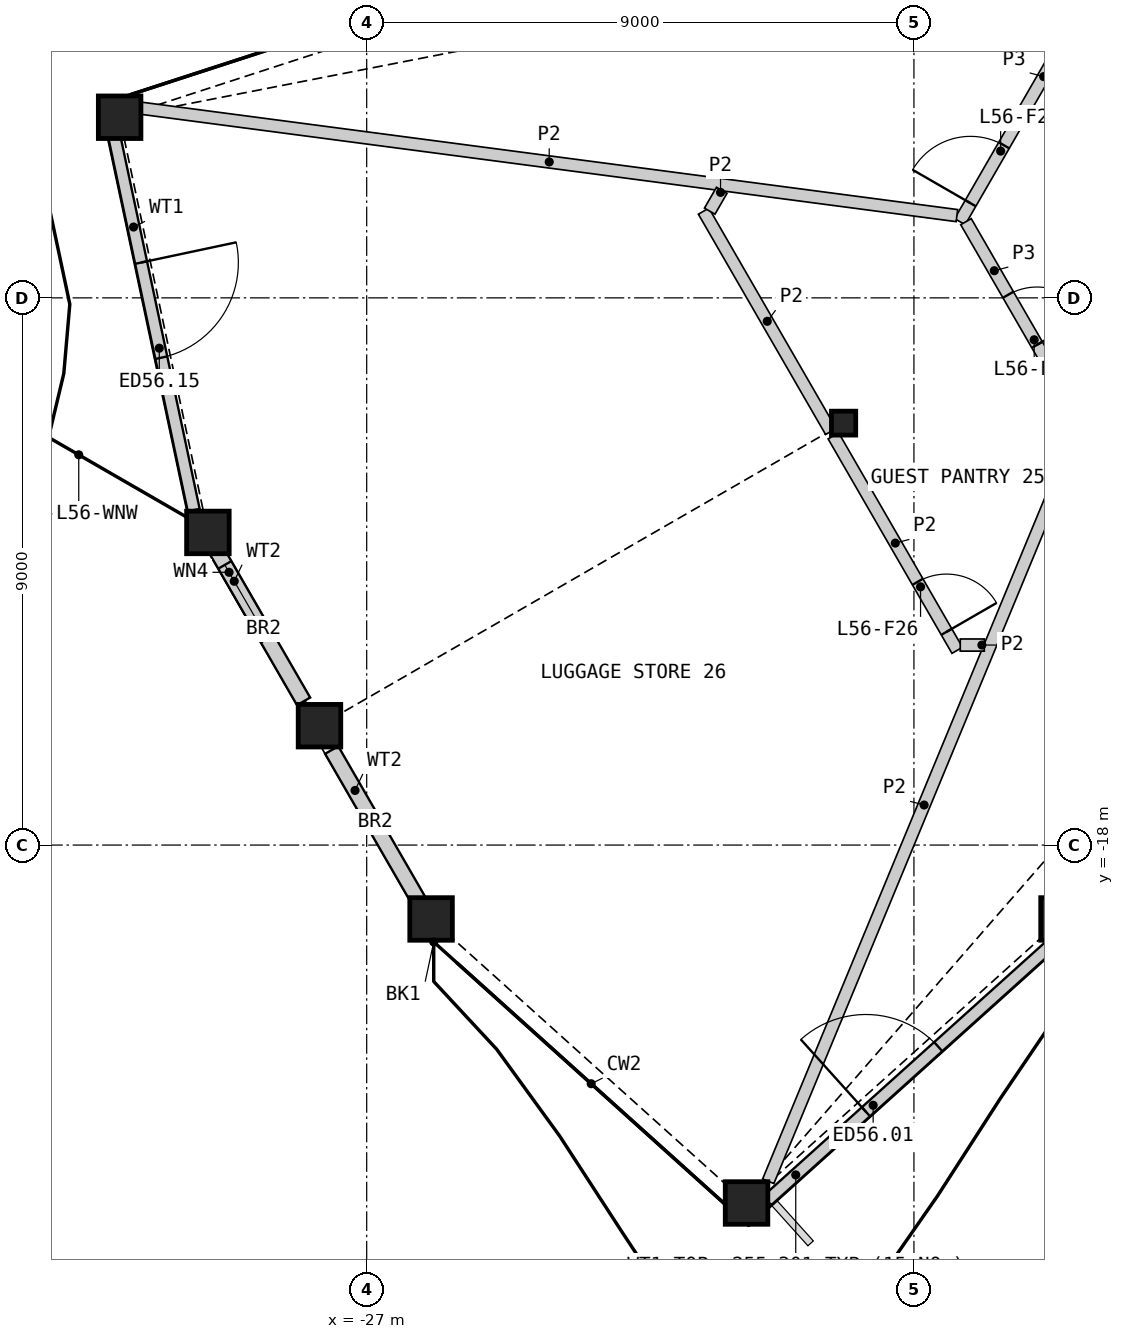
"""IFC4 building model, lengths in metres.
Left out: names, types, materials, properties, quantities, classifications, styles, units other than length and angle.
Written with IfcOpenShell. Run it as: python <this file> out.ifc"""

import sys

from ifc_helpers import new_model, si_unit, direction, frame, frame_2d, origin, origin_2d, place, context, subcontext, project, spatial, rectangle, hollow_rectangle, i_section, extrude, element, fill, save


model = new_model("IFC4")
c1 = context("Model", 3, precision=1e-05, world=origin(), true_north=direction((0.0, 1.0)))
c2 = subcontext(c1, "Body", "Model", "MODEL_VIEW")
j1 = project(units=[si_unit("LENGTHUNIT", "METRE"), si_unit("PLANEANGLEUNIT", "RADIAN")], contexts=[c1])
p1 = place(None, origin())
s1 = spatial("IfcSite", under=j1, at=p1, CompositionType="ELEMENT")
p2 = place(p1, origin())
s2 = spatial("IfcBuilding", under=s1, at=p2, CompositionType="ELEMENT")
p3 = place(p2, frame((0.0, 0.0, 252.6)))
s3 = spatial("IfcBuildingStorey", under=s2, at=p3, CompositionType="ELEMENT", Elevation=252.6)
for number, where, z_axis, x_axis in (
    (1, (-25.941, -19.215, 0.0), (0.0, 0.0, 1.0), (1.0, 0.0, 0.0)),
    (2, (-20.753, -23.887, 0.0), (0.0, 0.0, 1.0), (1.0, 0.0, 0.0)),
    (3, (-15.565, -19.215, 0.0), (0.0, 0.0, 1.0), (1.0, 0.0, 0.0)),
    (4, (-31.063, -6.029, 0.0), (0.0, 0.0, 1.0), (1.0, 0.0, 0.0)),
    (5, (-29.612, -12.858, 0.0), (0.0, 0.0, 1.0), (1.0, 0.0, 0.0)),
    (6, (-27.776, -16.037, 0.0), (0.0, 0.0, 1.0), (1.0, 0.0, 0.0)),
):
    element("IfcColumn", number, at=place(p3, frame(where, z_axis=z_axis, x_axis=x_axis)), inside=s3, PredefinedType="COLUMN", context=c2, shape_type="SweptSolid", body=[
        extrude(hollow_rectangle(XDim=0.7, YDim=0.7, WallThickness=0.045, at=origin_2d()), origin(), (0.0, 0.0, 1.0), 3.6),
    ])
p4 = place(p3, frame((-19.157, -11.06, 0.0), z_axis=(0.0, 0.0, 1.0), x_axis=(1.0, 0.0, 0.0)))
e7 = element("IfcColumn", 7, at=p4, inside=s3, PredefinedType="COLUMN", context=c2, shape_type="SweptSolid", body=[
    extrude(i_section(OverallWidth=0.399, OverallDepth=0.393, WebThickness=0.023, FlangeThickness=0.037, at=origin_2d()), origin(), (0.0, 0.0, 1.0), 3.6),
])
p5 = place(p3, frame((-20.413, -23.848, 0.0), z_axis=(0.0, 0.0, 1.0), x_axis=(0.74314024121, 0.669135697668, 0.0)))
e8 = element("IfcWall", 8, at=p5, inside=s3, PredefinedType="SOLIDWALL", context=c2, shape_type="SweptSolid", body=[
    extrude(rectangle(XDim=6.311, YDim=0.2, at=frame_2d((3.156, 0.0))), origin(), (0.0, 0.0, 1.0), 2.701),
])
p6 = place(p5, frame((2.184, 0.0, 0.0)))
e9 = element("IfcOpeningElement", 9, at=p6, cuts=e8, PredefinedType="OPENING", context=c2, shape_type="SweptSolid", body=[
    extrude(rectangle(XDim=1.6, YDim=2.4, at=frame_2d((0.8, 1.2))), frame((0.0, 0.11, 0.0), z_axis=(0.0, -1.0, 0.0), x_axis=(1.0, 0.0, 0.0)), (0.0, 0.0, 1.0), 0.22),
])
p7 = place(p3, frame((-31.164, -6.283, 0.0), z_axis=(0.0, 0.0, 1.0), x_axis=(0.207900158502, -0.978150051932, 0.0)))
e10 = element("IfcWall", 10, at=p7, inside=s3, PredefinedType="SOLIDWALL", context=c2, shape_type="SweptSolid", body=[
    extrude(rectangle(XDim=6.347, YDim=0.2, at=frame_2d((3.174, 0.0))), origin(), (0.0, 0.0, 1.0), 2.701),
])
p8 = place(p7, frame((2.184, 0.0, 0.0)))
e11 = element("IfcOpeningElement", 11, at=p8, cuts=e10, PredefinedType="OPENING", context=c2, shape_type="SweptSolid", body=[
    extrude(rectangle(XDim=1.6, YDim=2.4, at=frame_2d((0.8, 1.2))), frame((0.0, 0.11, 0.0), z_axis=(0.0, -1.0, 0.0), x_axis=(1.0, 0.0, 0.0)), (0.0, 0.0, 1.0), 0.22),
])
p9 = place(p3, frame((-29.559, -13.002, 0.0), z_axis=(0.0, 0.0, 1.0), x_axis=(0.500023511883, -0.866011828767, 0.0)))
e12 = element("IfcWall", 12, at=p9, inside=s3, PredefinedType="SOLIDWALL", context=c2, shape_type="SweptSolid", body=[
    extrude(rectangle(XDim=3.042, YDim=0.25, at=frame_2d((1.521, 0.0))), origin(), (0.0, 0.0, 1.0), 2.701),
])
p10 = place(p9, frame((0.45, 0.0, 1.8)))
e13 = element("IfcOpeningElement", 13, at=p10, cuts=e12, PredefinedType="OPENING", context=c2, shape_type="SweptSolid", body=[
    extrude(rectangle(XDim=1.4, YDim=0.7, at=frame_2d((0.7, 0.35))), frame((0.0, 0.135, 0.0), z_axis=(0.0, -1.0, 0.0), x_axis=(1.0, 0.0, 0.0)), (0.0, 0.0, 1.0), 0.27),
])
p11 = place(p3, frame((-27.576, -16.437, 0.0), z_axis=(0.0, 0.0, 1.0), x_axis=(0.499976998774, -0.866038683141, 0.0)))
e14 = element("IfcWall", 14, at=p11, inside=s3, PredefinedType="SOLIDWALL", context=c2, shape_type="SweptSolid", body=[
    extrude(rectangle(XDim=3.072, YDim=0.25, at=frame_2d((1.536, 0.0))), origin(), (0.0, 0.0, 1.0), 2.701),
])
p12 = place(p3, frame((-17.244, -7.747, 0.0), z_axis=(0.0, 0.0, 1.0), x_axis=(0.500017753321, 0.866015153657, 0.0)))
e15 = element("IfcWall", 15, at=p12, inside=s3, PredefinedType="PARTITIONING", context=c2, shape_type="SweptSolid", body=[
    extrude(rectangle(XDim=5.51, YDim=0.2, at=frame_2d((2.755, 0.0))), origin(), (0.0, 0.0, 1.0), 3.25),
])
p13 = place(p12, frame((0.35, 0.0, 0.0)))
e16 = element("IfcOpeningElement", 16, at=p13, cuts=e15, PredefinedType="OPENING", context=c2, shape_type="SweptSolid", body=[
    extrude(rectangle(XDim=1.1, YDim=2.1, at=frame_2d((0.55, 1.05))), frame((0.0, 0.11, 0.0), z_axis=(0.0, -1.0, 0.0), x_axis=(1.0, 0.0, 0.0)), (0.0, 0.0, 1.0), 0.22),
])
p14 = place(p3, frame((-17.144, -7.747, 0.0), z_axis=(0.0, 0.0, 1.0), x_axis=(0.499958791762, -0.866049194065, 0.0)))
e17 = element("IfcWall", 17, at=p14, inside=s3, PredefinedType="PARTITIONING", context=c2, shape_type="SweptSolid", body=[
    extrude(rectangle(XDim=3.726, YDim=0.2, at=frame_2d((1.863, 0.0))), origin(), (0.0, 0.0, 1.0), 3.25),
])
p15 = place(p14, frame((1.388, 0.0, 0.0)))
e18 = element("IfcOpeningElement", 18, at=p15, cuts=e17, PredefinedType="OPENING", context=c2, shape_type="SweptSolid", body=[
    extrude(rectangle(XDim=0.95, YDim=2.1, at=frame_2d((0.475, 1.05))), frame((0.0, 0.11, 0.0), z_axis=(0.0, -1.0, 0.0), x_axis=(1.0, 0.0, 0.0)), (0.0, 0.0, 1.0), 0.22),
])
p16 = place(p3, frame((-30.703, -5.882, 0.0), z_axis=(0.0, 0.0, 1.0), x_axis=(0.991445815272, -0.130518946443, 0.0)))
e19 = element("IfcWall", 19, at=p16, inside=s3, PredefinedType="PARTITIONING", context=c2, shape_type="SweptSolid", body=[
    extrude(rectangle(XDim=13.526, YDim=0.2, at=frame_2d((6.763, 0.0))), origin(), (0.0, 0.0, 1.0), 2.404),
])
p17 = place(p3, frame((-20.396, -23.53, 0.0), z_axis=(0.0, 0.0, 1.0), x_axis=(0.382692998932, 0.923875569851, 0.0)))
e20 = element("IfcWall", 20, at=p17, inside=s3, PredefinedType="PARTITIONING", context=c2, shape_type="SweptSolid", body=[
    extrude(rectangle(XDim=13.397, YDim=0.2, at=frame_2d((6.698, 0.0))), origin(), (0.0, 0.0, 1.0), 2.404),
])
p18 = place(p3, frame((-21.458, -7.574, 0.0), z_axis=(0.0, 0.0, 1.0), x_axis=(0.499973304129, -0.866040816104, 0.0)))
e21 = element("IfcWall", 21, at=p18, inside=s3, PredefinedType="PARTITIONING", context=c2, shape_type="SweptSolid", body=[
    extrude(rectangle(XDim=4.184, YDim=0.2, at=frame_2d((2.092, 0.0))), origin(), (0.0, 0.0, 1.0), 2.404),
])
p19 = place(p3, frame((-19.325, -11.27, 0.0), z_axis=(0.0, 0.0, 1.0), x_axis=(0.500000928893, -0.866024867487, 0.0)))
e22 = element("IfcWall", 22, at=p19, inside=s3, PredefinedType="PARTITIONING", context=c2, shape_type="SweptSolid", body=[
    extrude(rectangle(XDim=4.073, YDim=0.2, at=frame_2d((2.036, 0.0))), origin(), (0.0, 0.0, 1.0), 2.404),
])
p20 = place(p19, frame((2.772, 0.0, 0.0)))
e23 = element("IfcOpeningElement", 23, at=p20, cuts=e22, PredefinedType="OPENING", context=c2, shape_type="SweptSolid", body=[
    extrude(rectangle(XDim=0.95, YDim=2.1, at=frame_2d((0.475, 1.05))), frame((0.0, 0.11, 0.0), z_axis=(0.0, -1.0, 0.0), x_axis=(1.0, 0.0, 0.0)), (0.0, 0.0, 1.0), 0.22),
])
for number, where, z_axis, x_axis in (
    (24, (-17.238, -14.71, 0.0), (0.0, 0.0, 1.0), (1.0, 0.0, 0.0)),
    (25, (-21.359, -7.574, 0.0), (0.0, 0.0, 1.0), (0.5, 0.866, 0.0)),
):
    element("IfcWall", number, at=place(p3, frame(where, z_axis=z_axis, x_axis=x_axis)), inside=s3, PredefinedType="PARTITIONING", context=c2, shape_type="SweptSolid", body=[
        extrude(rectangle(XDim=0.396, YDim=0.2, at=frame_2d((0.198, 0.0))), origin(), (0.0, 0.0, 1.0), 2.404),
    ])
p21 = place(p6, origin())
e26 = element("IfcDoor", 26, at=p21, inside=s3, OperationType="DOUBLE_DOOR_SINGLE_SWING", PredefinedType="DOOR", context=c2, shape_type="SweptSolid", body=[
    extrude(rectangle(XDim=1.6, YDim=2.4, at=frame_2d((0.8, 1.2))), frame((0.0, 0.025, 0.0), z_axis=(0.0, -1.0, 0.0), x_axis=(1.0, 0.0, 0.0)), (0.0, 0.0, 1.0), 0.05),
])
fill(e9, e26)
p22 = place(p8, origin())
e27 = element("IfcDoor", 27, at=p22, inside=s3, OperationType="DOUBLE_DOOR_SINGLE_SWING", PredefinedType="DOOR", context=c2, shape_type="SweptSolid", body=[
    extrude(rectangle(XDim=1.6, YDim=2.4, at=frame_2d((0.8, 1.2))), frame((0.0, 0.025, 0.0), z_axis=(0.0, -1.0, 0.0), x_axis=(1.0, 0.0, 0.0)), (0.0, 0.0, 1.0), 0.05),
])
fill(e11, e27)
p23 = place(p10, origin())
e28 = element("IfcWindow", 28, at=p23, inside=s3, PartitioningType="SINGLE_PANEL", PredefinedType="WINDOW", context=c2, shape_type="SweptSolid", body=[
    extrude(rectangle(XDim=1.4, YDim=0.7, at=frame_2d((0.7, 0.35))), frame((0.0, 0.03, 0.0), z_axis=(0.0, -1.0, 0.0), x_axis=(1.0, 0.0, 0.0)), (0.0, 0.0, 1.0), 0.06),
])
fill(e13, e28)
p24 = place(p13, origin())
e29 = element("IfcDoor", 29, at=p24, inside=s3, OperationType="SINGLE_SWING_LEFT", PredefinedType="DOOR", context=c2, shape_type="SweptSolid", body=[
    extrude(rectangle(XDim=1.1, YDim=2.1, at=frame_2d((0.55, 1.05))), frame((0.0, 0.025, 0.0), z_axis=(0.0, -1.0, 0.0), x_axis=(1.0, 0.0, 0.0)), (0.0, 0.0, 1.0), 0.05),
])
fill(e16, e29)
p25 = place(p15, origin())
e30 = element("IfcDoor", 30, at=p25, inside=s3, OperationType="SINGLE_SWING_RIGHT", PredefinedType="DOOR", context=c2, shape_type="SweptSolid", body=[
    extrude(rectangle(XDim=0.95, YDim=2.1, at=frame_2d((0.475, 1.05))), frame((0.0, 0.025, 0.0), z_axis=(0.0, -1.0, 0.0), x_axis=(1.0, 0.0, 0.0)), (0.0, 0.0, 1.0), 0.05),
])
fill(e18, e30)
p26 = place(p20, origin())
e31 = element("IfcDoor", 31, at=p26, inside=s3, OperationType="SINGLE_SWING_RIGHT", PredefinedType="DOOR", context=c2, shape_type="SweptSolid", body=[
    extrude(rectangle(XDim=0.95, YDim=2.1, at=frame_2d((0.475, 1.05))), frame((0.0, 0.025, 0.0), z_axis=(0.0, -1.0, 0.0), x_axis=(1.0, 0.0, 0.0)), (0.0, 0.0, 1.0), 0.05),
])
fill(e23, e31)
save(model, sys.argv[1])
